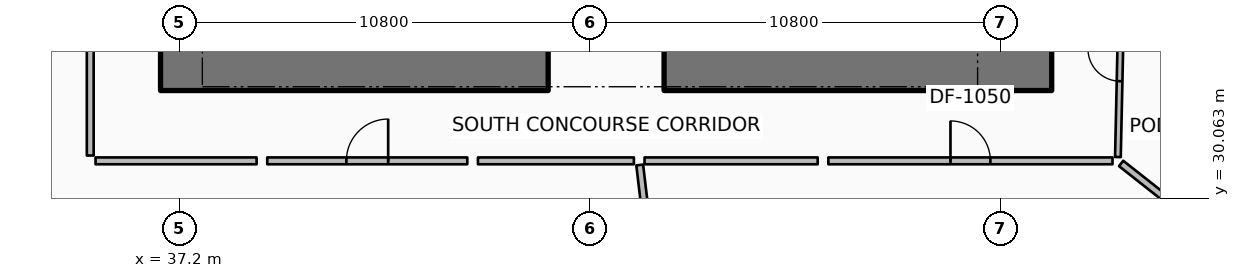
"""IFC4 building model, lengths in metres.
Left out: names, types, materials, properties, quantities, classifications, styles, units other than length and angle.
Written with IfcOpenShell. Run it as: python <this file> out.ifc"""

import sys

from ifc_helpers import new_model, si_unit, direction, frame, frame_2d, origin, place, context, subcontext, project, spatial, rectangle, extrude, element, fill, save


model = new_model("IFC4")
c1 = context("Model", 3, precision=1e-05, world=origin(), true_north=direction((0.0, 1.0)))
c2 = subcontext(c1, "Body", "Model", "MODEL_VIEW")
j1 = project(units=[si_unit("LENGTHUNIT", "METRE"), si_unit("PLANEANGLEUNIT", "RADIAN")], contexts=[c1])
p1 = place(None, origin())
s1 = spatial("IfcSite", under=j1, at=p1, CompositionType="ELEMENT")
p2 = place(p1, origin())
s2 = spatial("IfcBuilding", under=s1, at=p2, CompositionType="ELEMENT")
p3 = place(p2, frame((0.0, 0.0, 7.2)))
s3 = spatial("IfcBuildingStorey", under=s2, at=p3, CompositionType="ELEMENT", Elevation=7.2)
for number, where, z_axis, x_axis in (
    (1, (36.7, 33.45, 0.0), (0.0, 0.0, 1.0), (1.0, 0.0, 0.0)),
    (2, (49.95, 33.45, 0.0), (0.0, 0.0, 1.0), (1.0, 0.0, 0.0)),
):
    element("IfcWall", number, at=place(p3, frame(where, z_axis=z_axis, x_axis=x_axis)), inside=s3, PredefinedType="SHEAR", context=c2, shape_type="SweptSolid", body=[
        extrude(rectangle(XDim=10.2, YDim=1.1, at=frame_2d((5.1, 0.0))), origin(), (0.0, 0.0, 1.0), 4.8),
    ])
p4 = place(p3, frame((34.754, 34.582, 0.0), z_axis=(0.0, 0.0, 1.0), x_axis=(-0.872493211438, -0.488626233429, 0.0)))
e3 = element("IfcWall", 3, at=p4, inside=s3, PredefinedType="PARTITIONING", context=c2, shape_type="SweptSolid", body=[
    extrude(rectangle(XDim=20.159, YDim=0.18, at=frame_2d((10.079, 0.0))), origin(), (0.0, 0.0, 1.0), 3.693),
])
p5 = place(p3, frame((34.85, 34.496, 0.0), z_axis=(0.0, 0.0, 1.0), x_axis=(0.0, -1.0, 0.0)))
e4 = element("IfcWall", 4, at=p5, inside=s3, PredefinedType="PARTITIONING", context=c2, shape_type="SweptSolid", body=[
    extrude(rectangle(XDim=3.306, YDim=0.18, at=frame_2d((1.653, 0.0))), origin(), (0.0, 0.0, 1.0), 3.693),
])
p6 = place(p3, frame((34.99, 31.05, 0.0), z_axis=(0.0, 0.0, 1.0), x_axis=(1.0, 0.0, 0.0)))
e5 = element("IfcWall", 5, at=p6, inside=s3, PredefinedType="PARTITIONING", context=c2, shape_type="SweptSolid", body=[
    extrude(rectangle(XDim=4.238, YDim=0.18, at=frame_2d((2.119, 0.0))), origin(), (0.0, 0.0, 1.0), 3.693),
])
p7 = place(p3, frame((39.508, 31.05, 0.0), z_axis=(0.0, 0.0, 1.0), x_axis=(1.0, 0.0, 0.0)))
e6 = element("IfcWall", 6, at=p7, inside=s3, PredefinedType="PARTITIONING", context=c2, shape_type="SweptSolid", body=[
    extrude(rectangle(XDim=5.264, YDim=0.18, at=frame_2d((2.632, 0.0))), origin(), (0.0, 0.0, 1.0), 3.693),
])
p8 = place(p7, frame((2.082, 0.0, 0.0)))
e7 = element("IfcOpeningElement", 7, at=p8, cuts=e6, PredefinedType="OPENING", context=c2, shape_type="SweptSolid", body=[
    extrude(rectangle(XDim=1.1, YDim=2.1, at=frame_2d((0.55, 1.05))), frame((0.0, 0.1, 0.0), z_axis=(0.0, -1.0, 0.0), x_axis=(1.0, 0.0, 0.0)), (0.0, 0.0, 1.0), 0.2),
])
p9 = place(p3, frame((45.052, 31.05, 0.0), z_axis=(0.0, 0.0, 1.0), x_axis=(1.0, 0.0, 0.0)))
e8 = element("IfcWall", 8, at=p9, inside=s3, PredefinedType="PARTITIONING", context=c2, shape_type="SweptSolid", body=[
    extrude(rectangle(XDim=4.104, YDim=0.18, at=frame_2d((2.052, 0.0))), origin(), (0.0, 0.0, 1.0), 3.693),
])
p10 = place(p3, frame((49.309, 30.941, 0.0), z_axis=(0.0, 0.0, 1.0), x_axis=(0.117547531601, -0.993067257448, 0.0)))
e9 = element("IfcWall", 9, at=p10, inside=s3, PredefinedType="PARTITIONING", context=c2, shape_type="SweptSolid", body=[
    extrude(rectangle(XDim=17.548, YDim=0.18, at=frame_2d((8.774, 0.0))), origin(), (0.0, 0.0, 1.0), 3.693),
])
p11 = place(p3, frame((49.436, 31.05, 0.0), z_axis=(0.0, 0.0, 1.0), x_axis=(1.0, 0.0, 0.0)))
e10 = element("IfcWall", 10, at=p11, inside=s3, PredefinedType="PARTITIONING", context=c2, shape_type="SweptSolid", body=[
    extrude(rectangle(XDim=4.556, YDim=0.18, at=frame_2d((2.278, 0.0))), origin(), (0.0, 0.0, 1.0), 3.693),
])
p12 = place(p3, frame((54.272, 31.05, 0.0), z_axis=(0.0, 0.0, 1.0), x_axis=(1.0, 0.0, 0.0)))
e11 = element("IfcWall", 11, at=p12, inside=s3, PredefinedType="PARTITIONING", context=c2, shape_type="SweptSolid", body=[
    extrude(rectangle(XDim=7.478, YDim=0.18, at=frame_2d((3.739, 0.0))), origin(), (0.0, 0.0, 1.0), 3.693),
])
p13 = place(p12, frame((3.214, 0.0, 0.0)))
e12 = element("IfcOpeningElement", 12, at=p13, cuts=e11, PredefinedType="OPENING", context=c2, shape_type="SweptSolid", body=[
    extrude(rectangle(XDim=1.05, YDim=2.1, at=frame_2d((0.525, 1.05))), frame((0.0, 0.1, 0.0), z_axis=(0.0, -1.0, 0.0), x_axis=(1.0, 0.0, 0.0)), (0.0, 0.0, 1.0), 0.2),
])
p14 = place(p3, frame((61.976, 30.982, 0.0), z_axis=(0.0, 0.0, 1.0), x_axis=(0.785315783489, -0.619095404766, 0.0)))
e13 = element("IfcWall", 13, at=p14, inside=s3, PredefinedType="PARTITIONING", context=c2, shape_type="SweptSolid", body=[
    extrude(rectangle(XDim=13.661, YDim=0.18, at=frame_2d((6.831, 0.0))), origin(), (0.0, 0.0, 1.0), 3.693),
])
p15 = place(p3, frame((61.892, 31.15, 0.0), z_axis=(0.0, 0.0, 1.0), x_axis=(0.021928973177, 0.999759531155, 0.0)))
e14 = element("IfcWall", 14, at=p15, inside=s3, PredefinedType="PARTITIONING", context=c2, shape_type="SweptSolid", body=[
    extrude(rectangle(XDim=4.843, YDim=0.15, at=frame_2d((2.421, 0.0))), origin(), (0.0, 0.0, 1.0), 3.693),
])
p16 = place(p15, frame((1.997, 0.0, 0.0)))
e15 = element("IfcOpeningElement", 15, at=p16, cuts=e14, PredefinedType="OPENING", context=c2, shape_type="SweptSolid", body=[
    extrude(rectangle(XDim=0.85, YDim=2.06, at=frame_2d((0.425, 1.03))), frame((0.0, 0.085, 0.0), z_axis=(0.0, -1.0, 0.0), x_axis=(1.0, 0.0, 0.0)), (0.0, 0.0, 1.0), 0.17),
])
p17 = place(p3, frame((62.074, 36.041, 0.0), z_axis=(0.0, 0.0, 1.0), x_axis=(0.920841540816, -0.38993699069, 0.0)))
e16 = element("IfcWall", 16, at=p17, inside=s3, PredefinedType="PARTITIONING", context=c2, shape_type="SweptSolid", body=[
    extrude(rectangle(XDim=5.443, YDim=0.15, at=frame_2d((2.722, 0.0))), origin(), (0.0, 0.0, 1.0), 3.92),
])
p18 = place(p3, frame((62.106, 38.022, 0.0), z_axis=(0.0, 0.0, 1.0), x_axis=(0.962455233657, -0.271440459782, 0.0)))
e17 = element("IfcWall", 17, at=p18, inside=s3, PredefinedType="PARTITIONING", context=c2, shape_type="SweptSolid", body=[
    extrude(rectangle(XDim=19.716, YDim=0.18, at=frame_2d((9.858, 0.0))), origin(), (0.0, 0.0, 1.0), 3.693),
])
p19 = place(p8, origin())
e18 = element("IfcDoor", 18, at=p19, inside=s3, OperationType="SINGLE_SWING_RIGHT", PredefinedType="DOOR", context=c2, shape_type="SweptSolid", body=[
    extrude(rectangle(XDim=1.1, YDim=2.1, at=frame_2d((0.55, 1.05))), frame((0.0, 0.025, 0.0), z_axis=(0.0, -1.0, 0.0), x_axis=(1.0, 0.0, 0.0)), (0.0, 0.0, 1.0), 0.05),
])
fill(e7, e18)
p20 = place(p13, origin())
e19 = element("IfcDoor", 19, at=p20, inside=s3, OperationType="SINGLE_SWING_LEFT", PredefinedType="DOOR", context=c2, shape_type="SweptSolid", body=[
    extrude(rectangle(XDim=1.05, YDim=2.1, at=frame_2d((0.525, 1.05))), frame((0.0, 0.025, 0.0), z_axis=(0.0, -1.0, 0.0), x_axis=(1.0, 0.0, 0.0)), (0.0, 0.0, 1.0), 0.05),
])
fill(e12, e19)
p21 = place(p16, origin())
e20 = element("IfcDoor", 20, at=p21, inside=s3, OperationType="SINGLE_SWING_RIGHT", PredefinedType="DOOR", context=c2, shape_type="SweptSolid", body=[
    extrude(rectangle(XDim=0.85, YDim=2.06, at=frame_2d((0.425, 1.03))), frame((0.0, 0.025, 0.0), z_axis=(0.0, -1.0, 0.0), x_axis=(1.0, 0.0, 0.0)), (0.0, 0.0, 1.0), 0.05),
])
fill(e15, e20)
save(model, sys.argv[1])
